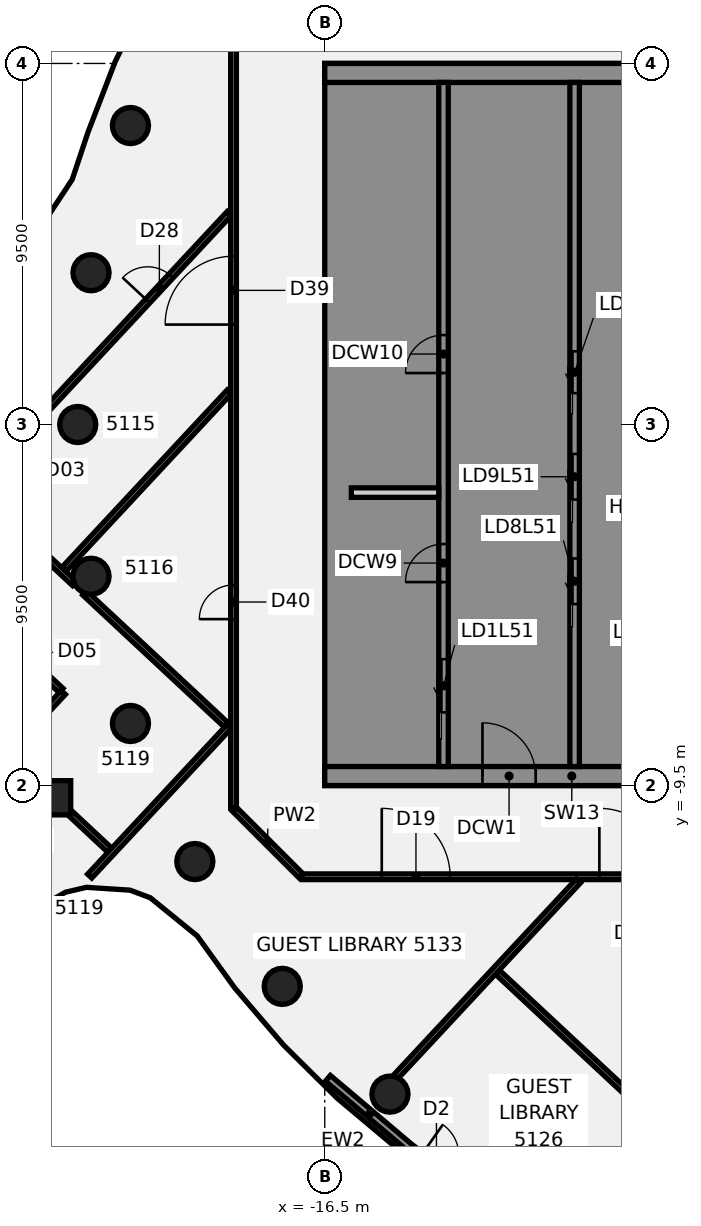
"""IFC4 building model, lengths in metres.
Left out: names, types, materials, properties, quantities, classifications, styles, units other than length and angle.
Written with IfcOpenShell. Run it as: python <this file> out.ifc"""

import sys

from ifc_helpers import new_model, si_unit, direction, frame, frame_2d, origin, origin_2d, place, context, subcontext, project, spatial, polyline, rectangle, circle, outline, extrude, element, fill, save


model = new_model("IFC4")
c1 = context("Model", 3, precision=1e-05, world=origin(), true_north=direction((0.0, 1.0)))
c2 = subcontext(c1, "Body", "Model", "MODEL_VIEW")
j1 = project(units=[si_unit("LENGTHUNIT", "METRE"), si_unit("PLANEANGLEUNIT", "RADIAN")], contexts=[c1])
p1 = place(None, origin())
s1 = spatial("IfcSite", under=j1, at=p1, CompositionType="ELEMENT")
p2 = place(p1, origin())
s2 = spatial("IfcBuilding", under=s1, at=p2, CompositionType="ELEMENT")
p3 = place(p2, frame((0.0, 0.0, 204.1)))
s3 = spatial("IfcBuildingStorey", under=s2, at=p3, CompositionType="ELEMENT", Elevation=204.1)
for number, where, z_axis, x_axis in (
    (1, (-21.613, 7.866, -0.14), (0.0, 0.0, 1.0), (1.0, 0.0, 0.0)),
    (2, (-22.651, 3.994, -0.14), (0.0, 0.0, 1.0), (1.0, 0.0, 0.0)),
    (3, (-23.0, 0.0, -0.14), (0.0, 0.0, 1.0), (1.0, 0.0, 0.0)),
    (4, (-22.651, -3.994, -0.14), (0.0, 0.0, 1.0), (1.0, 0.0, 0.0)),
    (5, (-21.613, -7.866, -0.14), (0.0, 0.0, 1.0), (1.0, 0.0, 0.0)),
    (6, (-19.919, -11.5, -0.14), (0.0, 0.0, 1.0), (1.0, 0.0, 0.0)),
    (7, (-17.619, -14.784, -0.14), (0.0, 0.0, 1.0), (1.0, 0.0, 0.0)),
    (8, (-14.784, -17.619, -0.14), (0.0, 0.0, 1.0), (1.0, 0.0, 0.0)),
):
    element("IfcColumn", number, at=place(p3, frame(where, z_axis=z_axis, x_axis=x_axis)), inside=s3, PredefinedType="COLUMN", context=c2, shape_type="SweptSolid", body=[
        extrude(circle(Radius=0.475, at=origin_2d()), origin(), (0.0, 0.0, 1.0), 3.6),
    ])
p4 = place(p3, frame((-23.635, -9.822, -0.139), z_axis=(0.049750170171, -0.00779464519, 0.998731277208), x_axis=(-0.730822792245, 0.681290927814, 0.041721912875)))
e9 = element("IfcColumn", 9, at=p4, inside=s3, PredefinedType="COLUMN", context=c2, shape_type="SweptSolid", body=[
    extrude(rectangle(XDim=0.9, YDim=0.9, at=origin_2d()), origin(), (0.0, 0.0, 1.0), 3.602),
])
p5 = place(p3, frame((-18.872, -10.128, 0.0), z_axis=(0.0, 0.0, 1.0), x_axis=(0.707106781187, -0.707106781187, 0.0)))
e10 = element("IfcWall", 10, at=p5, inside=s3, PredefinedType="PARTITIONING", context=c2, shape_type="SweptSolid", body=[
    extrude(rectangle(XDim=2.465, YDim=0.15, at=frame_2d((1.232, 0.0))), origin(), (0.0, 0.0, 1.0), 2.864),
])
p6 = place(p3, frame((-29.491, 1.788, 0.0), z_axis=(0.0, 0.0, 1.0), x_axis=(0.731478721907, -0.681864267576, 0.0)))
e11 = element("IfcWall", 11, at=p6, inside=s3, PredefinedType="PARTITIONING", context=c2, shape_type="SweptSolid", body=[
    extrude(rectangle(XDim=8.759, YDim=0.15, at=frame_2d((4.379, 0.0))), origin(), (0.0, 0.0, 1.0), 2.864),
])
p7 = place(p6, frame((5.799, 0.0, 0.0)))
e12 = element("IfcOpeningElement", 12, at=p7, cuts=e11, PredefinedType="OPENING", context=c2, shape_type="SweptSolid", body=[
    extrude(rectangle(XDim=1.4, YDim=2.1, at=frame_2d((0.7, 1.05))), frame((0.0, 0.085, 0.0), z_axis=(0.0, -1.0, 0.0), x_axis=(1.0, 0.0, 0.0)), (0.0, 0.0, 1.0), 0.17),
])
p8 = place(p3, frame((-22.817, -4.434, 0.0), z_axis=(0.0, 0.0, 1.0), x_axis=(0.731471057621, -0.681872489445, 0.0)))
e13 = element("IfcWall", 13, at=p8, inside=s3, PredefinedType="PARTITIONING", context=c2, shape_type="SweptSolid", body=[
    extrude(rectangle(XDim=5.095, YDim=0.15, at=frame_2d((2.547, 0.0))), origin(), (0.0, 0.0, 1.0), 2.864),
])
p9 = place(p3, frame((-23.193, -10.235, 0.0), z_axis=(0.0, 0.0, 1.0), x_axis=(0.731519928124, -0.681820060396, 0.0)))
e14 = element("IfcWall", 14, at=p9, inside=s3, PredefinedType="PARTITIONING", context=c2, shape_type="SweptSolid", body=[
    extrude(rectangle(XDim=1.415, YDim=0.15, at=frame_2d((0.708, 0.0))), origin(), (0.0, 0.0, 1.0), 2.864),
])
p10 = place(p3, frame((-25.222, -5.335, 0.0), z_axis=(0.0, 0.0, 1.0), x_axis=(0.731634049988, -0.681697599305, 0.0)))
e15 = element("IfcWall", 15, at=p10, inside=s3, PredefinedType="PARTITIONING", context=c2, shape_type="SweptSolid", body=[
    extrude(rectangle(XDim=2.44, YDim=0.15, at=frame_2d((1.22, 0.0))), origin(), (0.0, 0.0, 1.0), 2.864),
])
p11 = place(p10, frame((0.52, 0.0, 0.0)))
e16 = element("IfcOpeningElement", 16, at=p11, cuts=e15, PredefinedType="OPENING", context=c2, shape_type="SweptSolid", body=[
    extrude(rectangle(XDim=0.9, YDim=2.1, at=frame_2d((0.45, 1.05))), frame((0.0, 0.085, 0.0), z_axis=(0.0, -1.0, 0.0), x_axis=(1.0, 0.0, 0.0)), (0.0, 0.0, 1.0), 0.17),
])
p12 = place(p3, frame((-11.956, -14.412, 0.0), z_axis=(0.0, 0.0, 1.0), x_axis=(0.731533748832, -0.681805231954, 0.0)))
e17 = element("IfcWall", 17, at=p12, inside=s3, PredefinedType="PARTITIONING", context=c2, shape_type="SweptSolid", body=[
    extrude(rectangle(XDim=17.64, YDim=0.15, at=frame_2d((8.82, 0.0))), origin(), (0.0, 0.0, 1.0), 2.864),
])
p13 = place(p12, frame((8.92, 0.0, 0.0)))
e18 = element("IfcOpeningElement", 18, at=p13, cuts=e17, PredefinedType="OPENING", context=c2, shape_type="SweptSolid", body=[
    extrude(rectangle(XDim=1.8, YDim=2.1, at=frame_2d((0.9, 1.05))), frame((0.0, 0.085, 0.0), z_axis=(0.0, -1.0, 0.0), x_axis=(1.0, 0.0, 0.0)), (0.0, 0.0, 1.0), 0.17),
])
p14 = place(p3, frame((-17.1, -11.9, 0.0), z_axis=(0.0, 0.0, 1.0), x_axis=(1.0, 0.0, 0.0)))
e19 = element("IfcWall", 19, at=p14, inside=s3, PredefinedType="PARTITIONING", context=c2, shape_type="SweptSolid", body=[
    extrude(rectangle(XDim=34.165, YDim=0.15, at=frame_2d((17.083, 0.0))), origin(), (0.0, 0.0, 1.0), 2.864),
])
p15 = place(p14, frame((7.826, 0.0, 0.0)))
e20 = element("IfcOpeningElement", 20, at=p15, cuts=e19, PredefinedType="OPENING", context=c2, shape_type="SweptSolid", body=[
    extrude(rectangle(XDim=1.8, YDim=2.1, at=frame_2d((0.9, 1.05))), frame((0.0, 0.085, 0.0), z_axis=(0.0, -1.0, 0.0), x_axis=(1.0, 0.0, 0.0)), (0.0, 0.0, 1.0), 0.17),
])
p16 = place(p14, frame((2.1, 0.0, 0.0)))
e21 = element("IfcOpeningElement", 21, at=p16, cuts=e19, PredefinedType="OPENING", context=c2, shape_type="SweptSolid", body=[
    extrude(rectangle(XDim=1.8, YDim=2.1, at=frame_2d((0.9, 1.05))), frame((0.0, 0.085, 0.0), z_axis=(0.0, -1.0, 0.0), x_axis=(1.0, 0.0, 0.0)), (0.0, 0.0, 1.0), 0.17),
])
p17 = place(p14, frame((24.869, 0.0, 0.0)))
e22 = element("IfcOpeningElement", 22, at=p17, cuts=e19, PredefinedType="OPENING", context=c2, shape_type="SweptSolid", body=[
    extrude(rectangle(XDim=1.8, YDim=2.1, at=frame_2d((0.9, 1.05))), frame((0.0, 0.085, 0.0), z_axis=(0.0, -1.0, 0.0), x_axis=(1.0, 0.0, 0.0)), (0.0, 0.0, 1.0), 0.17),
])
p18 = place(p3, frame((-26.379, -10.271, 0.0), z_axis=(0.0, 0.0, 1.0), x_axis=(0.681669576902, 0.731660158767, 0.0)))
e23 = element("IfcWall", 23, at=p18, inside=s3, PredefinedType="PARTITIONING", context=c2, shape_type="SweptSolid", body=[
    extrude(rectangle(XDim=4.4, YDim=0.15, at=frame_2d((2.2, 0.0))), origin(), (0.0, 0.0, 1.0), 2.864),
])
p19 = place(p3, frame((-25.707, -1.631, 0.0), z_axis=(0.0, 0.0, 1.0), x_axis=(0.68177853135, 0.73155863346, 0.0)))
e24 = element("IfcWall", 24, at=p19, inside=s3, PredefinedType="PARTITIONING", context=c2, shape_type="SweptSolid", body=[
    extrude(rectangle(XDim=9.819, YDim=0.15, at=frame_2d((4.909, 0.0))), origin(), (0.0, 0.0, 1.0), 2.864),
])
p20 = place(p19, frame((6.67, 0.0, 0.0)))
e25 = element("IfcOpeningElement", 25, at=p20, cuts=e24, PredefinedType="OPENING", context=c2, shape_type="SweptSolid", body=[
    extrude(rectangle(XDim=0.9, YDim=2.1, at=frame_2d((0.45, 1.05))), frame((0.0, 0.085, 0.0), z_axis=(0.0, -1.0, 0.0), x_axis=(1.0, 0.0, 0.0)), (0.0, 0.0, 1.0), 0.17),
])
p21 = place(p3, frame((-23.365, -3.812, 0.0), z_axis=(0.0, 0.0, 1.0), x_axis=(0.681775833985, 0.731561147269, 0.0)))
e26 = element("IfcWall", 26, at=p21, inside=s3, PredefinedType="PARTITIONING", context=c2, shape_type="SweptSolid", body=[
    extrude(rectangle(XDim=6.385, YDim=0.15, at=frame_2d((3.192, 0.0))), origin(), (0.0, 0.0, 1.0), 2.864),
])
p22 = place(p3, frame((-22.685, -11.882, 0.0), z_axis=(0.0, 0.0, 1.0), x_axis=(0.681809400984, 0.731529863184, 0.0)))
e27 = element("IfcWall", 27, at=p22, inside=s3, PredefinedType="PARTITIONING", context=c2, shape_type="SweptSolid", body=[
    extrude(rectangle(XDim=5.386, YDim=0.15, at=frame_2d((2.693, 0.0))), origin(), (0.0, 0.0, 1.0), 2.864),
])
p23 = place(p3, frame((-14.639, -17.173, 0.0), z_axis=(0.0, 0.0, 1.0), x_axis=(0.681889565458, 0.731455139103, 0.0)))
e28 = element("IfcWall", 28, at=p23, inside=s3, PredefinedType="PARTITIONING", context=c2, shape_type="SweptSolid", body=[
    extrude(rectangle(XDim=7.063, YDim=0.15, at=frame_2d((3.532, 0.0))), origin(), (0.0, 0.0, 1.0), 2.864),
])
p24 = place(p3, frame((-18.9, -10.1, 0.0), z_axis=(0.0, 0.0, 1.0), x_axis=(0.0, 1.0, 0.0)))
e29 = element("IfcWall", 29, at=p24, inside=s3, PredefinedType="PARTITIONING", context=c2, shape_type="SweptSolid", body=[
    extrude(rectangle(XDim=20.2, YDim=0.15, at=frame_2d((10.1, 0.0))), origin(), (0.0, 0.0, 1.0), 2.864),
])
p25 = place(p24, frame((12.729, 0.0, 0.0)))
e30 = element("IfcOpeningElement", 30, at=p25, cuts=e29, PredefinedType="OPENING", context=c2, shape_type="SweptSolid", body=[
    extrude(rectangle(XDim=1.8, YDim=2.1, at=frame_2d((0.9, 1.05))), frame((0.0, 0.085, 0.0), z_axis=(0.0, -1.0, 0.0), x_axis=(1.0, 0.0, 0.0)), (0.0, 0.0, 1.0), 0.17),
])
p26 = place(p24, frame((4.979, 0.0, 0.0)))
e31 = element("IfcOpeningElement", 31, at=p26, cuts=e29, PredefinedType="OPENING", context=c2, shape_type="SweptSolid", body=[
    extrude(rectangle(XDim=0.9, YDim=2.1, at=frame_2d((0.45, 1.05))), frame((0.0, 0.085, 0.0), z_axis=(0.0, -1.0, 0.0), x_axis=(1.0, 0.0, 0.0)), (0.0, 0.0, 1.0), 0.17),
])
p27 = place(p3, frame((-16.417, -17.204, 0.0), z_axis=(0.0, 0.0, 1.0), x_axis=(0.763350977543, -0.645983966585, 0.0)))
e32 = element("IfcWall", 32, at=p27, inside=s3, PredefinedType="SOLIDWALL", context=c2, shape_type="SweptSolid", body=[
    extrude(rectangle(XDim=2.885, YDim=0.2, at=frame_2d((1.443, 0.0))), origin(), (0.0, 0.0, 1.0), 3.46),
])
p28 = place(p3, frame((-14.215, -19.067, 0.0), z_axis=(0.0, 0.0, 1.0), x_axis=(0.817111616449, -0.57647949336, 0.0)))
e33 = element("IfcWall", 33, at=p28, inside=s3, PredefinedType="SOLIDWALL", context=c2, shape_type="SweptSolid", body=[
    extrude(rectangle(XDim=1.6, YDim=0.2, at=frame_2d((0.8, 0.0))), origin(), (0.0, 0.0, 1.0), 3.46),
])
p29 = place(p28, frame((0.3, 0.0, 0.0)))
e34 = element("IfcOpeningElement", 34, at=p29, cuts=e33, PredefinedType="OPENING", context=c2, shape_type="SweptSolid", body=[
    extrude(rectangle(XDim=1.0, YDim=2.4, at=frame_2d((0.5, 1.2))), frame((0.0, 0.11, 0.0), z_axis=(0.0, -1.0, 0.0), x_axis=(1.0, 0.0, 0.0)), (0.0, 0.0, 1.0), 0.22),
])
p30 = place(p3, frame((-16.5, -9.25, 0.0), z_axis=(0.0, 0.0, 1.0), x_axis=(1.0, 0.0, 0.0)))
e35 = element("IfcWall", 35, at=p30, inside=s3, PredefinedType="SHEAR", context=c2, shape_type="SweptSolid", body=[
    extrude(rectangle(XDim=13.0, YDim=0.5, at=frame_2d((6.5, 0.0))), origin(), (0.0, 0.0, 1.0), 3.46),
])
p31 = place(p30, frame((4.15, 0.0, 0.0)))
e36 = element("IfcOpeningElement", 36, at=p31, cuts=e35, PredefinedType="OPENING", context=c2, shape_type="SweptSolid", body=[
    extrude(rectangle(XDim=1.4, YDim=2.1, at=frame_2d((0.7, 1.05))), frame((0.0, 0.26, 0.0), z_axis=(0.0, -1.0, 0.0), x_axis=(1.0, 0.0, 0.0)), (0.0, 0.0, 1.0), 0.52),
])
p32 = place(p30, frame((10.125, 0.0, 0.0)))
e37 = element("IfcOpeningElement", 37, at=p32, cuts=e35, PredefinedType="OPENING", context=c2, shape_type="SweptSolid", body=[
    extrude(rectangle(XDim=1.4, YDim=2.1, at=frame_2d((0.7, 1.05))), frame((0.0, 0.26, 0.0), z_axis=(0.0, -1.0, 0.0), x_axis=(1.0, 0.0, 0.0)), (0.0, 0.0, 1.0), 0.52),
])
p33 = place(p3, origin())
e38 = element("IfcWall", 38, at=p33, inside=s3, PredefinedType="SHEAR", context=c2, shape_type="SweptSolid", body=[
    extrude(outline(polyline([(-13.5, -8.125), (-16.0, -8.125), (-16.0, -5.625), (-13.5, -5.625), (-13.5, -5.375), (-16.0, -5.375), (-16.0, 5.375), (-13.5, 5.375), (-13.5, 5.625), (-16.0, 5.625), (-16.0, 8.125), (-13.5, 8.125), (-13.5, 9.0), (-16.0, 9.0), (-16.5, 9.0), (-16.5, -9.0), (-16.0, -9.0), (-13.5, -9.0), (-13.5, -8.125)])), origin(), (0.0, 0.0, 1.0), 3.46),
])
p34 = place(p3, frame((-16.5, 9.25, 0.0), z_axis=(0.0, 0.0, 1.0), x_axis=(1.0, 0.0, 0.0)))
e39 = element("IfcWall", 39, at=p34, inside=s3, PredefinedType="SHEAR", context=c2, shape_type="SweptSolid", body=[
    extrude(rectangle(XDim=13.0, YDim=0.5, at=frame_2d((6.5, 0.0))), origin(), (0.0, 0.0, 1.0), 3.46),
])
p35 = place(p3, origin())
e40 = element("IfcWall", 40, at=p35, inside=s3, PredefinedType="SHEAR", context=c2, shape_type="SweptSolid", body=[
    extrude(outline(polyline([(-9.8, -5.375), (-9.8, -5.625), (-7.5, -5.625), (-7.25, -5.625), (-7.25, 9.0), (-7.5, 9.0), (-9.8, 9.0), (-9.8, 8.125), (-7.5, 8.125), (-7.5, 5.625), (-9.8, 5.625), (-9.8, 5.375), (-7.5, 5.375), (-7.5, 2.875), (-9.8, 2.875), (-9.8, 2.625), (-7.5, 2.625), (-7.5, 0.125), (-9.8, 0.125), (-9.8, -0.125), (-7.5, -0.125), (-7.5, -2.625), (-9.8, -2.625), (-9.8, -2.875), (-7.5, -2.875), (-7.5, -5.375), (-9.8, -5.375)])), origin(), (0.0, 0.0, 1.0), 3.46),
])
p36 = place(p3, origin())
e41 = element("IfcWall", 41, at=p36, inside=s3, PredefinedType="SHEAR", context=c2, shape_type="SweptSolid", body=[
    extrude(outline(polyline([(-7.5, -8.125), (-9.55, -8.125), (-9.55, -5.625), (-9.8, -5.625), (-9.8, -8.125), (-9.8, -9.0), (-7.5, -9.0), (-7.5, -8.125)])), origin(), (0.0, 0.0, 1.0), 3.46),
])
p37 = place(p3, frame((-13.375, -9.0, 0.0), z_axis=(0.0, 0.0, 1.0), x_axis=(0.0, 1.0, 0.0)))
e42 = element("IfcWall", 42, at=p37, inside=s3, PredefinedType="SHEAR", context=c2, shape_type="SweptSolid", body=[
    extrude(rectangle(XDim=18.0, YDim=0.25, at=frame_2d((9.0, 0.0))), origin(), (0.0, 0.0, 1.0), 3.46),
])
p38 = place(p37, frame((1.425, 0.0, 0.0)))
e43 = element("IfcOpeningElement", 43, at=p38, cuts=e42, PredefinedType="OPENING", context=c2, shape_type="SweptSolid", body=[
    extrude(rectangle(XDim=1.4, YDim=2.1, at=frame_2d((0.7, 1.05))), frame((0.0, 0.135, 0.0), z_axis=(0.0, -1.0, 0.0), x_axis=(1.0, 0.0, 0.0)), (0.0, 0.0, 1.0), 0.27),
])
p39 = place(p37, frame((4.854, 0.0, 0.0)))
e44 = element("IfcOpeningElement", 44, at=p39, cuts=e42, PredefinedType="OPENING", context=c2, shape_type="SweptSolid", body=[
    extrude(rectangle(XDim=1.0, YDim=2.1, at=frame_2d((0.5, 1.05))), frame((0.0, 0.135, 0.0), z_axis=(0.0, -1.0, 0.0), x_axis=(1.0, 0.0, 0.0)), (0.0, 0.0, 1.0), 0.27),
])
p40 = place(p37, frame((10.354, 0.0, 0.0)))
e45 = element("IfcOpeningElement", 45, at=p40, cuts=e42, PredefinedType="OPENING", context=c2, shape_type="SweptSolid", body=[
    extrude(rectangle(XDim=1.0, YDim=2.1, at=frame_2d((0.5, 1.05))), frame((0.0, 0.135, 0.0), z_axis=(0.0, -1.0, 0.0), x_axis=(1.0, 0.0, 0.0)), (0.0, 0.0, 1.0), 0.27),
])
p41 = place(p3, frame((-9.925, -9.0, 0.0), z_axis=(0.0, 0.0, 1.0), x_axis=(0.0, 1.0, 0.0)))
e46 = element("IfcWall", 46, at=p41, inside=s3, PredefinedType="SHEAR", context=c2, shape_type="SweptSolid", body=[
    extrude(rectangle(XDim=18.0, YDim=0.25, at=frame_2d((9.0, 0.0))), origin(), (0.0, 0.0, 1.0), 3.46),
])
p42 = place(p41, frame((4.275, 0.0, 0.0)))
e47 = element("IfcOpeningElement", 47, at=p42, cuts=e46, PredefinedType="OPENING", context=c2, shape_type="SweptSolid", body=[
    extrude(rectangle(XDim=1.2, YDim=2.1, at=frame_2d((0.6, 1.05))), frame((0.0, 0.135, 0.0), z_axis=(0.0, -1.0, 0.0), x_axis=(1.0, 0.0, 0.0)), (0.0, 0.0, 1.0), 0.27),
])
p43 = place(p41, frame((7.025, 0.0, 0.0)))
e48 = element("IfcOpeningElement", 48, at=p43, cuts=e46, PredefinedType="OPENING", context=c2, shape_type="SweptSolid", body=[
    extrude(rectangle(XDim=1.2, YDim=2.1, at=frame_2d((0.6, 1.05))), frame((0.0, 0.135, 0.0), z_axis=(0.0, -1.0, 0.0), x_axis=(1.0, 0.0, 0.0)), (0.0, 0.0, 1.0), 0.27),
])
p44 = place(p41, frame((9.825, 0.0, 0.0)))
e49 = element("IfcOpeningElement", 49, at=p44, cuts=e46, PredefinedType="OPENING", context=c2, shape_type="SweptSolid", body=[
    extrude(rectangle(XDim=1.1, YDim=2.1, at=frame_2d((0.55, 1.05))), frame((0.0, 0.135, 0.0), z_axis=(0.0, -1.0, 0.0), x_axis=(1.0, 0.0, 0.0)), (0.0, 0.0, 1.0), 0.27),
])
p45 = place(p3, frame((-15.8, -1.792, 0.0), z_axis=(0.0, 0.0, 1.0), x_axis=(1.0, 0.0, 0.0)))
e50 = element("IfcWall", 50, at=p45, inside=s3, PredefinedType="PARTITIONING", context=c2, shape_type="SweptSolid", body=[
    extrude(rectangle(XDim=2.3, YDim=0.25, at=frame_2d((1.15, 0.0))), origin(), (0.0, 0.0, 1.0), 3.46),
])
p46 = place(p15, origin())
e51 = element("IfcDoor", 51, at=p46, inside=s3, OperationType="DOUBLE_DOOR_SINGLE_SWING", PredefinedType="DOOR", context=c2, shape_type="SweptSolid", body=[
    extrude(rectangle(XDim=1.8, YDim=2.1, at=frame_2d((0.9, 1.05))), frame((0.0, 0.025, 0.0), z_axis=(0.0, -1.0, 0.0), x_axis=(1.0, 0.0, 0.0)), (0.0, 0.0, 1.0), 0.05),
])
fill(e20, e51)
p47 = place(p16, frame((1.8, 0.0, 0.0), z_axis=(0.0, 0.0, 1.0), x_axis=(-1.0, 0.0, 0.0)))
e52 = element("IfcDoor", 52, at=p47, inside=s3, OperationType="DOUBLE_DOOR_SINGLE_SWING", PredefinedType="DOOR", context=c2, shape_type="SweptSolid", body=[
    extrude(rectangle(XDim=1.8, YDim=2.1, at=frame_2d((0.9, 1.05))), frame((0.0, 0.025, 0.0), z_axis=(0.0, -1.0, 0.0), x_axis=(1.0, 0.0, 0.0)), (0.0, 0.0, 1.0), 0.05),
])
fill(e21, e52)
p48 = place(p20, origin())
e53 = element("IfcDoor", 53, at=p48, inside=s3, OperationType="SINGLE_SWING_LEFT", PredefinedType="DOOR", context=c2, shape_type="SweptSolid", body=[
    extrude(rectangle(XDim=0.9, YDim=2.1, at=frame_2d((0.45, 1.05))), frame((0.0, 0.025, 0.0), z_axis=(0.0, -1.0, 0.0), x_axis=(1.0, 0.0, 0.0)), (0.0, 0.0, 1.0), 0.05),
])
fill(e25, e53)
p49 = place(p25, frame((1.8, 0.0, 0.0), z_axis=(0.0, 0.0, 1.0), x_axis=(-1.0, 0.0, 0.0)))
e54 = element("IfcDoor", 54, at=p49, inside=s3, OperationType="DOUBLE_DOOR_SINGLE_SWING", PredefinedType="DOOR", context=c2, shape_type="SweptSolid", body=[
    extrude(rectangle(XDim=1.8, YDim=2.1, at=frame_2d((0.9, 1.05))), frame((0.0, 0.025, 0.0), z_axis=(0.0, -1.0, 0.0), x_axis=(1.0, 0.0, 0.0)), (0.0, 0.0, 1.0), 0.05),
])
fill(e30, e54)
p50 = place(p26, origin())
e55 = element("IfcDoor", 55, at=p50, inside=s3, OperationType="SINGLE_SWING_RIGHT", PredefinedType="DOOR", context=c2, shape_type="SweptSolid", body=[
    extrude(rectangle(XDim=0.9, YDim=2.1, at=frame_2d((0.45, 1.05))), frame((0.0, 0.025, 0.0), z_axis=(0.0, -1.0, 0.0), x_axis=(1.0, 0.0, 0.0)), (0.0, 0.0, 1.0), 0.05),
])
fill(e31, e55)
p51 = place(p31, origin())
e56 = element("IfcDoor", 56, at=p51, inside=s3, OperationType="SINGLE_SWING_LEFT", PredefinedType="DOOR", context=c2, shape_type="SweptSolid", body=[
    extrude(rectangle(XDim=1.4, YDim=2.1, at=frame_2d((0.7, 1.05))), frame((0.0, 0.025, 0.0), z_axis=(0.0, -1.0, 0.0), x_axis=(1.0, 0.0, 0.0)), (0.0, 0.0, 1.0), 0.05),
])
fill(e36, e56)
p52 = place(p38, origin())
e57 = element("IfcDoor", 57, at=p52, inside=s3, OperationType="SLIDING_TO_LEFT", PredefinedType="DOOR", context=c2, shape_type="SweptSolid", body=[
    extrude(rectangle(XDim=1.4, YDim=2.1, at=frame_2d((0.7, 1.05))), frame((0.0, 0.025, 0.0), z_axis=(0.0, -1.0, 0.0), x_axis=(1.0, 0.0, 0.0)), (0.0, 0.0, 1.0), 0.05),
])
fill(e43, e57)
p53 = place(p42, origin())
e58 = element("IfcDoor", 58, at=p53, inside=s3, OperationType="SLIDING_TO_LEFT", PredefinedType="DOOR", context=c2, shape_type="SweptSolid", body=[
    extrude(rectangle(XDim=1.2, YDim=2.1, at=frame_2d((0.6, 1.05))), frame((0.0, 0.025, 0.0), z_axis=(0.0, -1.0, 0.0), x_axis=(1.0, 0.0, 0.0)), (0.0, 0.0, 1.0), 0.05),
])
fill(e47, e58)
p54 = place(p43, origin())
e59 = element("IfcDoor", 59, at=p54, inside=s3, OperationType="SLIDING_TO_LEFT", PredefinedType="DOOR", context=c2, shape_type="SweptSolid", body=[
    extrude(rectangle(XDim=1.2, YDim=2.1, at=frame_2d((0.6, 1.05))), frame((0.0, 0.025, 0.0), z_axis=(0.0, -1.0, 0.0), x_axis=(1.0, 0.0, 0.0)), (0.0, 0.0, 1.0), 0.05),
])
fill(e48, e59)
p55 = place(p44, origin())
e60 = element("IfcDoor", 60, at=p55, inside=s3, OperationType="SLIDING_TO_LEFT", PredefinedType="DOOR", context=c2, shape_type="SweptSolid", body=[
    extrude(rectangle(XDim=1.1, YDim=2.1, at=frame_2d((0.55, 1.05))), frame((0.0, 0.025, 0.0), z_axis=(0.0, -1.0, 0.0), x_axis=(1.0, 0.0, 0.0)), (0.0, 0.0, 1.0), 0.05),
])
fill(e49, e60)
p56 = place(p39, origin())
e61 = element("IfcDoor", 61, at=p56, inside=s3, OperationType="SINGLE_SWING_LEFT", PredefinedType="DOOR", context=c2, shape_type="SweptSolid", body=[
    extrude(rectangle(XDim=1.0, YDim=2.1, at=frame_2d((0.5, 1.05))), frame((0.0, 0.025, 0.0), z_axis=(0.0, -1.0, 0.0), x_axis=(1.0, 0.0, 0.0)), (0.0, 0.0, 1.0), 0.05),
])
fill(e44, e61)
p57 = place(p40, origin())
e62 = element("IfcDoor", 62, at=p57, inside=s3, OperationType="SINGLE_SWING_LEFT", PredefinedType="DOOR", context=c2, shape_type="SweptSolid", body=[
    extrude(rectangle(XDim=1.0, YDim=2.1, at=frame_2d((0.5, 1.05))), frame((0.0, 0.025, 0.0), z_axis=(0.0, -1.0, 0.0), x_axis=(1.0, 0.0, 0.0)), (0.0, 0.0, 1.0), 0.05),
])
fill(e45, e62)
save(model, sys.argv[1])
